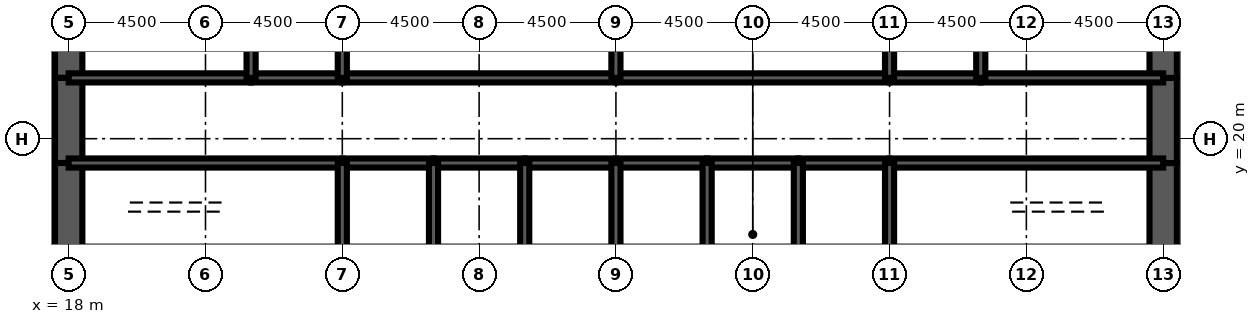
"""IFC4 building model, lengths in metres.
Left out: names, types, materials, properties, quantities, classifications, styles, units other than length and angle.
Written with IfcOpenShell. Run it as: python <this file> out.ifc"""

import sys

from ifc_helpers import new_model, si_unit, direction, frame, frame_2d, origin, place, context, subcontext, project, spatial, rectangle, extrude, element, fill, save


model = new_model("IFC4")
c1 = context("Model", 3, precision=1e-05, world=origin(), true_north=direction((0.0, 1.0)))
c2 = subcontext(c1, "Body", "Model", "MODEL_VIEW")
j1 = project(units=[si_unit("LENGTHUNIT", "METRE"), si_unit("PLANEANGLEUNIT", "RADIAN")], contexts=[c1])
p1 = place(None, origin())
s1 = spatial("IfcSite", under=j1, at=p1, CompositionType="ELEMENT")
p2 = place(p1, origin())
s2 = spatial("IfcBuilding", under=s1, at=p2, CompositionType="ELEMENT")
p3 = place(p2, frame((0.0, 0.0, 138.3)))
s3 = spatial("IfcBuildingStorey", under=s2, at=p3, CompositionType="ELEMENT", Elevation=138.3)
p4 = place(p3, frame((18.0, 26.0, 0.0), z_axis=(0.0, 0.0, 1.0), x_axis=(0.0, -1.0, 0.0)))
e1 = element("IfcWall", 1, at=p4, inside=s3, PredefinedType="SHEAR", context=c2, shape_type="SweptSolid", body=[
    extrude(rectangle(XDim=4.0, YDim=0.9, at=frame_2d((2.0, 0.0))), origin(), (0.0, 0.0, 1.0), 4.2),
])
p5 = place(p3, frame((18.0, 22.0, 0.0), z_axis=(0.0, 0.0, 1.0), x_axis=(0.0, -1.0, 0.0)))
e2 = element("IfcWall", 2, at=p5, inside=s3, PredefinedType="SHEAR", context=c2, shape_type="SweptSolid", body=[
    extrude(rectangle(XDim=2.8, YDim=0.9, at=frame_2d((1.4, 0.0))), origin(), (0.0, 0.0, 1.0), 4.2),
])
p6 = place(p5, frame((0.6, 0.0, 0.0)))
e3 = element("IfcOpeningElement", 3, at=p6, cuts=e2, PredefinedType="OPENING", context=c2, shape_type="SweptSolid", body=[
    extrude(rectangle(XDim=1.8, YDim=2.1, at=frame_2d((0.9, 1.05))), frame((0.0, 0.46, 0.0), z_axis=(0.0, -1.0, 0.0), x_axis=(1.0, 0.0, 0.0)), (0.0, 0.0, 1.0), 0.92),
])
for number, where, z_axis, x_axis in (
    (4, (18.0, 19.2, 0.0), (0.0, 0.0, 1.0), (0.0, -1.0, 0.0)),
    (5, (54.0, 16.0, 0.0), (0.0, 0.0, 1.0), (0.0, 1.0, 0.0)),
):
    element("IfcWall", number, at=place(p3, frame(where, z_axis=z_axis, x_axis=x_axis)), inside=s3, PredefinedType="SHEAR", context=c2, shape_type="SweptSolid", body=[
        extrude(rectangle(XDim=3.2, YDim=0.9, at=frame_2d((1.6, 0.0))), origin(), (0.0, 0.0, 1.0), 4.2),
    ])
p7 = place(p3, frame((54.0, 19.2, 0.0), z_axis=(0.0, 0.0, 1.0), x_axis=(0.0, 1.0, 0.0)))
e6 = element("IfcWall", 6, at=p7, inside=s3, PredefinedType="SHEAR", context=c2, shape_type="SweptSolid", body=[
    extrude(rectangle(XDim=2.8, YDim=0.9, at=frame_2d((1.4, 0.0))), origin(), (0.0, 0.0, 1.0), 4.2),
])
p8 = place(p7, frame((0.4, 0.0, 0.0)))
e7 = element("IfcOpeningElement", 7, at=p8, cuts=e6, PredefinedType="OPENING", context=c2, shape_type="SweptSolid", body=[
    extrude(rectangle(XDim=1.8, YDim=2.1, at=frame_2d((0.9, 1.05))), frame((0.0, 0.46, 0.0), z_axis=(0.0, -1.0, 0.0), x_axis=(1.0, 0.0, 0.0)), (0.0, 0.0, 1.0), 0.92),
])
p9 = place(p3, frame((54.0, 22.0, 0.0), z_axis=(0.0, 0.0, 1.0), x_axis=(0.0, 1.0, 0.0)))
e8 = element("IfcWall", 8, at=p9, inside=s3, PredefinedType="SHEAR", context=c2, shape_type="SweptSolid", body=[
    extrude(rectangle(XDim=4.0, YDim=0.9, at=frame_2d((2.0, 0.0))), origin(), (0.0, 0.0, 1.0), 4.2),
])
p10 = place(p3, frame((18.0, 19.2, 0.0), z_axis=(0.0, 0.0, 1.0), x_axis=(1.0, 0.0, 0.0)))
e9 = element("IfcWall", 9, at=p10, inside=s3, PredefinedType="SOLIDWALL", context=c2, shape_type="SweptSolid", body=[
    extrude(rectangle(XDim=9.0, YDim=0.3, at=frame_2d((4.5, 0.0))), origin(), (0.0, 0.0, 1.0), 4.2),
])
p11 = place(p10, frame((0.65, 0.0, 0.0)))
e10 = element("IfcOpeningElement", 10, at=p11, cuts=e9, PredefinedType="OPENING", context=c2, shape_type="SweptSolid", body=[
    extrude(rectangle(XDim=1.0, YDim=2.1, at=frame_2d((0.5, 1.05))), frame((0.0, 0.16, 0.0), z_axis=(0.0, -1.0, 0.0), x_axis=(1.0, 0.0, 0.0)), (0.0, 0.0, 1.0), 0.32),
])
p12 = place(p3, frame((27.0, 19.2, 0.0), z_axis=(0.0, 0.0, 1.0), x_axis=(1.0, 0.0, 0.0)))
e11 = element("IfcWall", 11, at=p12, inside=s3, PredefinedType="SOLIDWALL", context=c2, shape_type="SweptSolid", body=[
    extrude(rectangle(XDim=3.0, YDim=0.3, at=frame_2d((1.5, 0.0))), origin(), (0.0, 0.0, 1.0), 4.2),
])
p13 = place(p12, frame((0.95, 0.0, 0.0)))
e12 = element("IfcOpeningElement", 12, at=p13, cuts=e11, PredefinedType="OPENING", context=c2, shape_type="SweptSolid", body=[
    extrude(rectangle(XDim=1.1, YDim=2.2, at=frame_2d((0.55, 1.1))), frame((0.0, 0.16, 0.0), z_axis=(0.0, -1.0, 0.0), x_axis=(1.0, 0.0, 0.0)), (0.0, 0.0, 1.0), 0.32),
])
p14 = place(p3, frame((30.0, 19.2, 0.0), z_axis=(0.0, 0.0, 1.0), x_axis=(1.0, 0.0, 0.0)))
e13 = element("IfcWall", 13, at=p14, inside=s3, PredefinedType="SOLIDWALL", context=c2, shape_type="SweptSolid", body=[
    extrude(rectangle(XDim=3.0, YDim=0.3, at=frame_2d((1.5, 0.0))), origin(), (0.0, 0.0, 1.0), 4.2),
])
p15 = place(p14, frame((0.95, 0.0, 0.0)))
e14 = element("IfcOpeningElement", 14, at=p15, cuts=e13, PredefinedType="OPENING", context=c2, shape_type="SweptSolid", body=[
    extrude(rectangle(XDim=1.1, YDim=2.2, at=frame_2d((0.55, 1.1))), frame((0.0, 0.16, 0.0), z_axis=(0.0, -1.0, 0.0), x_axis=(1.0, 0.0, 0.0)), (0.0, 0.0, 1.0), 0.32),
])
p16 = place(p3, frame((33.0, 19.2, 0.0), z_axis=(0.0, 0.0, 1.0), x_axis=(1.0, 0.0, 0.0)))
e15 = element("IfcWall", 15, at=p16, inside=s3, PredefinedType="SOLIDWALL", context=c2, shape_type="SweptSolid", body=[
    extrude(rectangle(XDim=3.0, YDim=0.3, at=frame_2d((1.5, 0.0))), origin(), (0.0, 0.0, 1.0), 4.2),
])
p17 = place(p16, frame((0.95, 0.0, 0.0)))
e16 = element("IfcOpeningElement", 16, at=p17, cuts=e15, PredefinedType="OPENING", context=c2, shape_type="SweptSolid", body=[
    extrude(rectangle(XDim=1.1, YDim=2.2, at=frame_2d((0.55, 1.1))), frame((0.0, 0.16, 0.0), z_axis=(0.0, -1.0, 0.0), x_axis=(1.0, 0.0, 0.0)), (0.0, 0.0, 1.0), 0.32),
])
p18 = place(p3, frame((36.0, 19.2, 0.0), z_axis=(0.0, 0.0, 1.0), x_axis=(1.0, 0.0, 0.0)))
e17 = element("IfcWall", 17, at=p18, inside=s3, PredefinedType="SOLIDWALL", context=c2, shape_type="SweptSolid", body=[
    extrude(rectangle(XDim=3.0, YDim=0.3, at=frame_2d((1.5, 0.0))), origin(), (0.0, 0.0, 1.0), 4.2),
])
p19 = place(p18, frame((0.95, 0.0, 0.0)))
e18 = element("IfcOpeningElement", 18, at=p19, cuts=e17, PredefinedType="OPENING", context=c2, shape_type="SweptSolid", body=[
    extrude(rectangle(XDim=1.1, YDim=2.2, at=frame_2d((0.55, 1.1))), frame((0.0, 0.16, 0.0), z_axis=(0.0, -1.0, 0.0), x_axis=(1.0, 0.0, 0.0)), (0.0, 0.0, 1.0), 0.32),
])
p20 = place(p3, frame((39.0, 19.2, 0.0), z_axis=(0.0, 0.0, 1.0), x_axis=(1.0, 0.0, 0.0)))
e19 = element("IfcWall", 19, at=p20, inside=s3, PredefinedType="SOLIDWALL", context=c2, shape_type="SweptSolid", body=[
    extrude(rectangle(XDim=3.0, YDim=0.3, at=frame_2d((1.5, 0.0))), origin(), (0.0, 0.0, 1.0), 4.2),
])
p21 = place(p20, frame((1.0, 0.0, 0.0)))
e20 = element("IfcOpeningElement", 20, at=p21, cuts=e19, PredefinedType="OPENING", context=c2, shape_type="SweptSolid", body=[
    extrude(rectangle(XDim=1.0, YDim=2.1, at=frame_2d((0.5, 1.05))), frame((0.0, 0.16, 0.0), z_axis=(0.0, -1.0, 0.0), x_axis=(1.0, 0.0, 0.0)), (0.0, 0.0, 1.0), 0.32),
])
p22 = place(p3, frame((42.0, 19.2, 0.0), z_axis=(0.0, 0.0, 1.0), x_axis=(1.0, 0.0, 0.0)))
e21 = element("IfcWall", 21, at=p22, inside=s3, PredefinedType="SOLIDWALL", context=c2, shape_type="SweptSolid", body=[
    extrude(rectangle(XDim=3.0, YDim=0.3, at=frame_2d((1.5, 0.0))), origin(), (0.0, 0.0, 1.0), 4.2),
])
p23 = place(p3, frame((45.0, 19.2, 0.0), z_axis=(0.0, 0.0, 1.0), x_axis=(1.0, 0.0, 0.0)))
e22 = element("IfcWall", 22, at=p23, inside=s3, PredefinedType="SOLIDWALL", context=c2, shape_type="SweptSolid", body=[
    extrude(rectangle(XDim=9.0, YDim=0.3, at=frame_2d((4.5, 0.0))), origin(), (0.0, 0.0, 1.0), 4.2),
])
p24 = place(p23, frame((7.35, 0.0, 0.0)))
e23 = element("IfcOpeningElement", 23, at=p24, cuts=e22, PredefinedType="OPENING", context=c2, shape_type="SweptSolid", body=[
    extrude(rectangle(XDim=1.0, YDim=2.1, at=frame_2d((0.5, 1.05))), frame((0.0, 0.16, 0.0), z_axis=(0.0, -1.0, 0.0), x_axis=(1.0, 0.0, 0.0)), (0.0, 0.0, 1.0), 0.32),
])
p25 = place(p3, frame((18.0, 22.0, 0.0), z_axis=(0.0, 0.0, 1.0), x_axis=(1.0, 0.0, 0.0)))
e24 = element("IfcWall", 24, at=p25, inside=s3, PredefinedType="SOLIDWALL", context=c2, shape_type="SweptSolid", body=[
    extrude(rectangle(XDim=6.0, YDim=0.3, at=frame_2d((3.0, 0.0))), origin(), (0.0, 0.0, 1.0), 4.2),
])
p26 = place(p25, frame((4.4, 0.0, 0.0)))
e25 = element("IfcOpeningElement", 25, at=p26, cuts=e24, PredefinedType="OPENING", context=c2, shape_type="SweptSolid", body=[
    extrude(rectangle(XDim=1.0, YDim=2.1, at=frame_2d((0.5, 1.05))), frame((0.0, 0.16, 0.0), z_axis=(0.0, -1.0, 0.0), x_axis=(1.0, 0.0, 0.0)), (0.0, 0.0, 1.0), 0.32),
])
p27 = place(p25, frame((1.0, 0.0, 0.0)))
e26 = element("IfcOpeningElement", 26, at=p27, cuts=e24, PredefinedType="OPENING", context=c2, shape_type="SweptSolid", body=[
    extrude(rectangle(XDim=1.0, YDim=2.1, at=frame_2d((0.5, 1.05))), frame((0.0, 0.16, 0.0), z_axis=(0.0, -1.0, 0.0), x_axis=(1.0, 0.0, 0.0)), (0.0, 0.0, 1.0), 0.32),
])
p28 = place(p3, frame((24.0, 22.0, 0.0), z_axis=(0.0, 0.0, 1.0), x_axis=(1.0, 0.0, 0.0)))
e27 = element("IfcWall", 27, at=p28, inside=s3, PredefinedType="SOLIDWALL", context=c2, shape_type="SweptSolid", body=[
    extrude(rectangle(XDim=3.0, YDim=0.3, at=frame_2d((1.5, 0.0))), origin(), (0.0, 0.0, 1.0), 4.2),
])
p29 = place(p28, frame((1.0, 0.0, 0.0)))
e28 = element("IfcOpeningElement", 28, at=p29, cuts=e27, PredefinedType="OPENING", context=c2, shape_type="SweptSolid", body=[
    extrude(rectangle(XDim=1.0, YDim=2.1, at=frame_2d((0.5, 1.05))), frame((0.0, 0.16, 0.0), z_axis=(0.0, -1.0, 0.0), x_axis=(1.0, 0.0, 0.0)), (0.0, 0.0, 1.0), 0.32),
])
p30 = place(p3, frame((27.0, 22.0, 0.0), z_axis=(0.0, 0.0, 1.0), x_axis=(1.0, 0.0, 0.0)))
e29 = element("IfcWall", 29, at=p30, inside=s3, PredefinedType="SOLIDWALL", context=c2, shape_type="SweptSolid", body=[
    extrude(rectangle(XDim=9.0, YDim=0.3, at=frame_2d((4.5, 0.0))), origin(), (0.0, 0.0, 1.0), 4.2),
])
p31 = place(p30, frame((4.0, 0.0, 0.0)))
e30 = element("IfcOpeningElement", 30, at=p31, cuts=e29, PredefinedType="OPENING", context=c2, shape_type="SweptSolid", body=[
    extrude(rectangle(XDim=1.0, YDim=2.1, at=frame_2d((0.5, 1.05))), frame((0.0, 0.16, 0.0), z_axis=(0.0, -1.0, 0.0), x_axis=(1.0, 0.0, 0.0)), (0.0, 0.0, 1.0), 0.32),
])
p32 = place(p3, frame((36.0, 22.0, 0.0), z_axis=(0.0, 0.0, 1.0), x_axis=(1.0, 0.0, 0.0)))
e31 = element("IfcWall", 31, at=p32, inside=s3, PredefinedType="SOLIDWALL", context=c2, shape_type="SweptSolid", body=[
    extrude(rectangle(XDim=9.0, YDim=0.3, at=frame_2d((4.5, 0.0))), origin(), (0.0, 0.0, 1.0), 4.2),
])
p33 = place(p32, frame((4.0, 0.0, 0.0)))
e32 = element("IfcOpeningElement", 32, at=p33, cuts=e31, PredefinedType="OPENING", context=c2, shape_type="SweptSolid", body=[
    extrude(rectangle(XDim=1.0, YDim=2.1, at=frame_2d((0.5, 1.05))), frame((0.0, 0.16, 0.0), z_axis=(0.0, -1.0, 0.0), x_axis=(1.0, 0.0, 0.0)), (0.0, 0.0, 1.0), 0.32),
])
p34 = place(p3, frame((45.0, 22.0, 0.0), z_axis=(0.0, 0.0, 1.0), x_axis=(1.0, 0.0, 0.0)))
e33 = element("IfcWall", 33, at=p34, inside=s3, PredefinedType="SOLIDWALL", context=c2, shape_type="SweptSolid", body=[
    extrude(rectangle(XDim=3.0, YDim=0.3, at=frame_2d((1.5, 0.0))), origin(), (0.0, 0.0, 1.0), 4.2),
])
p35 = place(p34, frame((1.0, 0.0, 0.0)))
e34 = element("IfcOpeningElement", 34, at=p35, cuts=e33, PredefinedType="OPENING", context=c2, shape_type="SweptSolid", body=[
    extrude(rectangle(XDim=1.0, YDim=2.1, at=frame_2d((0.5, 1.05))), frame((0.0, 0.16, 0.0), z_axis=(0.0, -1.0, 0.0), x_axis=(1.0, 0.0, 0.0)), (0.0, 0.0, 1.0), 0.32),
])
p36 = place(p3, frame((48.0, 22.0, 0.0), z_axis=(0.0, 0.0, 1.0), x_axis=(1.0, 0.0, 0.0)))
e35 = element("IfcWall", 35, at=p36, inside=s3, PredefinedType="SOLIDWALL", context=c2, shape_type="SweptSolid", body=[
    extrude(rectangle(XDim=6.0, YDim=0.3, at=frame_2d((3.0, 0.0))), origin(), (0.0, 0.0, 1.0), 4.2),
])
p37 = place(p36, frame((2.0, 0.0, 0.0)))
e36 = element("IfcOpeningElement", 36, at=p37, cuts=e35, PredefinedType="OPENING", context=c2, shape_type="SweptSolid", body=[
    extrude(rectangle(XDim=1.0, YDim=2.1, at=frame_2d((0.5, 1.05))), frame((0.0, 0.16, 0.0), z_axis=(0.0, -1.0, 0.0), x_axis=(1.0, 0.0, 0.0)), (0.0, 0.0, 1.0), 0.32),
])
p38 = place(p36, frame((4.0, 0.0, 0.0)))
e37 = element("IfcOpeningElement", 37, at=p38, cuts=e35, PredefinedType="OPENING", context=c2, shape_type="SweptSolid", body=[
    extrude(rectangle(XDim=1.0, YDim=2.1, at=frame_2d((0.5, 1.05))), frame((0.0, 0.16, 0.0), z_axis=(0.0, -1.0, 0.0), x_axis=(1.0, 0.0, 0.0)), (0.0, 0.0, 1.0), 0.32),
])
for number, where, z_axis, x_axis in (
    (38, (27.0, 16.0, 0.0), (0.0, 0.0, 1.0), (0.0, 1.0, 0.0)),
    (39, (30.0, 16.0, 0.0), (0.0, 0.0, 1.0), (0.0, 1.0, 0.0)),
    (40, (33.0, 16.0, 0.0), (0.0, 0.0, 1.0), (0.0, 1.0, 0.0)),
    (41, (36.0, 16.0, 0.0), (0.0, 0.0, 1.0), (0.0, 1.0, 0.0)),
    (42, (39.0, 16.0, 0.0), (0.0, 0.0, 1.0), (0.0, 1.0, 0.0)),
    (43, (42.0, 16.0, 0.0), (0.0, 0.0, 1.0), (0.0, 1.0, 0.0)),
    (44, (45.0, 16.0, 0.0), (0.0, 0.0, 1.0), (0.0, 1.0, 0.0)),
):
    element("IfcWall", number, at=place(p3, frame(where, z_axis=z_axis, x_axis=x_axis)), inside=s3, PredefinedType="SOLIDWALL", context=c2, shape_type="SweptSolid", body=[
        extrude(rectangle(XDim=3.2, YDim=0.3, at=frame_2d((1.6, 0.0))), origin(), (0.0, 0.0, 1.0), 4.2),
    ])
for number, where, z_axis, x_axis in (
    (45, (24.0, 22.0, 0.0), (0.0, 0.0, 1.0), (0.0, 1.0, 0.0)),
    (46, (27.0, 22.0, 0.0), (0.0, 0.0, 1.0), (0.0, 1.0, 0.0)),
    (47, (36.0, 22.0, 0.0), (0.0, 0.0, 1.0), (0.0, 1.0, 0.0)),
    (48, (45.0, 22.0, 0.0), (0.0, 0.0, 1.0), (0.0, 1.0, 0.0)),
    (49, (48.0, 22.0, 0.0), (0.0, 0.0, 1.0), (0.0, 1.0, 0.0)),
):
    element("IfcWall", number, at=place(p3, frame(where, z_axis=z_axis, x_axis=x_axis)), inside=s3, PredefinedType="SOLIDWALL", context=c2, shape_type="SweptSolid", body=[
        extrude(rectangle(XDim=4.0, YDim=0.3, at=frame_2d((2.0, 0.0))), origin(), (0.0, 0.0, 1.0), 4.2),
    ])
p39 = place(p3, frame((39.15, 17.4, 0.0), z_axis=(0.0, 0.0, 1.0), x_axis=(1.0, 0.0, 0.0)))
e50 = element("IfcWall", 50, at=p39, inside=s3, PredefinedType="SOLIDWALL", context=c2, shape_type="SweptSolid", body=[
    extrude(rectangle(XDim=2.7, YDim=0.3, at=frame_2d((1.35, 0.0))), origin(), (0.0, 0.0, 1.0), 4.04),
])
p40 = place(p39, frame((0.85, 0.0, 0.0)))
e51 = element("IfcOpeningElement", 51, at=p40, cuts=e50, PredefinedType="OPENING", context=c2, shape_type="SweptSolid", body=[
    extrude(rectangle(XDim=1.0, YDim=2.1, at=frame_2d((0.5, 1.05))), frame((0.0, 0.16, 0.0), z_axis=(0.0, -1.0, 0.0), x_axis=(1.0, 0.0, 0.0)), (0.0, 0.0, 1.0), 0.32),
])
p41 = place(p3, frame((39.0, 22.15, 0.0), z_axis=(0.0, 0.0, 1.0), x_axis=(0.0, 1.0, 0.0)))
e52 = element("IfcWall", 52, at=p41, inside=s3, PredefinedType="PARTITIONING", context=c2, shape_type="SweptSolid", body=[
    extrude(rectangle(XDim=3.7, YDim=0.15, at=frame_2d((1.85, 0.0))), origin(), (0.0, 0.0, 1.0), 3.0),
])
p42 = place(p41, frame((2.2, 0.0, 0.0)))
e53 = element("IfcOpeningElement", 53, at=p42, cuts=e52, PredefinedType="OPENING", context=c2, shape_type="SweptSolid", body=[
    extrude(rectangle(XDim=1.0, YDim=2.1, at=frame_2d((0.5, 1.05))), frame((0.0, 0.085, 0.0), z_axis=(0.0, -1.0, 0.0), x_axis=(1.0, 0.0, 0.0)), (0.0, 0.0, 1.0), 0.17),
])
for number, where, z_axis, x_axis in (
    (54, (20.625, 22.15, 0.0), (0.0, 0.0, 1.0), (0.0, 1.0, 0.0)),
    (55, (51.375, 22.15, 0.0), (0.0, 0.0, 1.0), (0.0, 1.0, 0.0)),
):
    element("IfcWall", number, at=place(p3, frame(where, z_axis=z_axis, x_axis=x_axis)), inside=s3, PredefinedType="PARTITIONING", context=c2, shape_type="SweptSolid", body=[
        extrude(rectangle(XDim=3.7, YDim=0.15, at=frame_2d((1.85, 0.0))), origin(), (0.0, 0.0, 1.0), 3.0),
    ])
p43 = place(p40, origin())
e56 = element("IfcDoor", 56, at=p43, inside=s3, OperationType="SINGLE_SWING_LEFT", PredefinedType="DOOR", context=c2, shape_type="SweptSolid", body=[
    extrude(rectangle(XDim=1.0, YDim=2.1, at=frame_2d((0.5, 1.05))), frame((0.0, 0.025, 0.0), z_axis=(0.0, -1.0, 0.0), x_axis=(1.0, 0.0, 0.0)), (0.0, 0.0, 1.0), 0.05),
])
fill(e51, e56)
p44 = place(p13, origin())
e57 = element("IfcDoor", 57, at=p44, inside=s3, OperationType="DOUBLE_DOOR_SLIDING", PredefinedType="USERDEFINED", context=c2, shape_type="SweptSolid", body=[
    extrude(rectangle(XDim=1.1, YDim=2.2, at=frame_2d((0.55, 1.1))), frame((0.0, 0.025, 0.0), z_axis=(0.0, -1.0, 0.0), x_axis=(1.0, 0.0, 0.0)), (0.0, 0.0, 1.0), 0.05),
])
fill(e12, e57)
p45 = place(p15, origin())
e58 = element("IfcDoor", 58, at=p45, inside=s3, OperationType="DOUBLE_DOOR_SLIDING", PredefinedType="USERDEFINED", context=c2, shape_type="SweptSolid", body=[
    extrude(rectangle(XDim=1.1, YDim=2.2, at=frame_2d((0.55, 1.1))), frame((0.0, 0.025, 0.0), z_axis=(0.0, -1.0, 0.0), x_axis=(1.0, 0.0, 0.0)), (0.0, 0.0, 1.0), 0.05),
])
fill(e14, e58)
p46 = place(p17, origin())
e59 = element("IfcDoor", 59, at=p46, inside=s3, OperationType="DOUBLE_DOOR_SLIDING", PredefinedType="USERDEFINED", context=c2, shape_type="SweptSolid", body=[
    extrude(rectangle(XDim=1.1, YDim=2.2, at=frame_2d((0.55, 1.1))), frame((0.0, 0.025, 0.0), z_axis=(0.0, -1.0, 0.0), x_axis=(1.0, 0.0, 0.0)), (0.0, 0.0, 1.0), 0.05),
])
fill(e16, e59)
p47 = place(p19, origin())
e60 = element("IfcDoor", 60, at=p47, inside=s3, OperationType="DOUBLE_DOOR_SLIDING", PredefinedType="USERDEFINED", context=c2, shape_type="SweptSolid", body=[
    extrude(rectangle(XDim=1.1, YDim=2.2, at=frame_2d((0.55, 1.1))), frame((0.0, 0.025, 0.0), z_axis=(0.0, -1.0, 0.0), x_axis=(1.0, 0.0, 0.0)), (0.0, 0.0, 1.0), 0.05),
])
fill(e18, e60)
p48 = place(p11, origin())
e61 = element("IfcDoor", 61, at=p48, inside=s3, OperationType="SINGLE_SWING_LEFT", PredefinedType="DOOR", context=c2, shape_type="SweptSolid", body=[
    extrude(rectangle(XDim=1.0, YDim=2.1, at=frame_2d((0.5, 1.05))), frame((0.0, 0.025, 0.0), z_axis=(0.0, -1.0, 0.0), x_axis=(1.0, 0.0, 0.0)), (0.0, 0.0, 1.0), 0.05),
])
fill(e10, e61)
p49 = place(p24, origin())
e62 = element("IfcDoor", 62, at=p49, inside=s3, OperationType="SINGLE_SWING_RIGHT", PredefinedType="DOOR", context=c2, shape_type="SweptSolid", body=[
    extrude(rectangle(XDim=1.0, YDim=2.1, at=frame_2d((0.5, 1.05))), frame((0.0, 0.025, 0.0), z_axis=(0.0, -1.0, 0.0), x_axis=(1.0, 0.0, 0.0)), (0.0, 0.0, 1.0), 0.05),
])
fill(e23, e62)
p50 = place(p6, origin())
e63 = element("IfcDoor", 63, at=p50, inside=s3, OperationType="SINGLE_SWING_LEFT", PredefinedType="DOOR", context=c2, shape_type="SweptSolid", body=[
    extrude(rectangle(XDim=1.8, YDim=2.1, at=frame_2d((0.9, 1.05))), frame((0.0, 0.45, 0.0), z_axis=(0.0, -1.0, 0.0), x_axis=(1.0, 0.0, 0.0)), (0.0, 0.0, 1.0), 0.899),
])
fill(e3, e63)
p51 = place(p8, origin())
e64 = element("IfcDoor", 64, at=p51, inside=s3, OperationType="SINGLE_SWING_LEFT", PredefinedType="DOOR", context=c2, shape_type="SweptSolid", body=[
    extrude(rectangle(XDim=1.8, YDim=2.1, at=frame_2d((0.9, 1.05))), frame((0.0, 0.45, 0.0), z_axis=(0.0, -1.0, 0.0), x_axis=(1.0, 0.0, 0.0)), (0.0, 0.0, 1.0), 0.899),
])
fill(e7, e64)
p52 = place(p26, origin())
e65 = element("IfcDoor", 65, at=p52, inside=s3, OperationType="SINGLE_SWING_RIGHT", PredefinedType="DOOR", context=c2, shape_type="SweptSolid", body=[
    extrude(rectangle(XDim=1.0, YDim=2.1, at=frame_2d((0.5, 1.05))), frame((0.0, 0.025, 0.0), z_axis=(0.0, -1.0, 0.0), x_axis=(1.0, 0.0, 0.0)), (0.0, 0.0, 1.0), 0.05),
])
fill(e25, e65)
p53 = place(p29, origin())
e66 = element("IfcDoor", 66, at=p53, inside=s3, OperationType="SINGLE_SWING_LEFT", PredefinedType="DOOR", context=c2, shape_type="SweptSolid", body=[
    extrude(rectangle(XDim=1.0, YDim=2.1, at=frame_2d((0.5, 1.05))), frame((0.0, 0.025, 0.0), z_axis=(0.0, -1.0, 0.0), x_axis=(1.0, 0.0, 0.0)), (0.0, 0.0, 1.0), 0.05),
])
fill(e28, e66)
p54 = place(p31, origin())
e67 = element("IfcDoor", 67, at=p54, inside=s3, OperationType="SINGLE_SWING_LEFT", PredefinedType="DOOR", context=c2, shape_type="SweptSolid", body=[
    extrude(rectangle(XDim=1.0, YDim=2.1, at=frame_2d((0.5, 1.05))), frame((0.0, 0.025, 0.0), z_axis=(0.0, -1.0, 0.0), x_axis=(1.0, 0.0, 0.0)), (0.0, 0.0, 1.0), 0.05),
])
fill(e30, e67)
p55 = place(p33, origin())
e68 = element("IfcDoor", 68, at=p55, inside=s3, OperationType="SINGLE_SWING_LEFT", PredefinedType="DOOR", context=c2, shape_type="SweptSolid", body=[
    extrude(rectangle(XDim=1.0, YDim=2.1, at=frame_2d((0.5, 1.05))), frame((0.0, 0.025, 0.0), z_axis=(0.0, -1.0, 0.0), x_axis=(1.0, 0.0, 0.0)), (0.0, 0.0, 1.0), 0.05),
])
fill(e32, e68)
p56 = place(p35, origin())
e69 = element("IfcDoor", 69, at=p56, inside=s3, OperationType="SINGLE_SWING_LEFT", PredefinedType="DOOR", context=c2, shape_type="SweptSolid", body=[
    extrude(rectangle(XDim=1.0, YDim=2.1, at=frame_2d((0.5, 1.05))), frame((0.0, 0.025, 0.0), z_axis=(0.0, -1.0, 0.0), x_axis=(1.0, 0.0, 0.0)), (0.0, 0.0, 1.0), 0.05),
])
fill(e34, e69)
p57 = place(p37, origin())
e70 = element("IfcDoor", 70, at=p57, inside=s3, OperationType="SINGLE_SWING_LEFT", PredefinedType="DOOR", context=c2, shape_type="SweptSolid", body=[
    extrude(rectangle(XDim=1.0, YDim=2.1, at=frame_2d((0.5, 1.05))), frame((0.0, 0.025, 0.0), z_axis=(0.0, -1.0, 0.0), x_axis=(1.0, 0.0, 0.0)), (0.0, 0.0, 1.0), 0.05),
])
fill(e36, e70)
p58 = place(p27, origin())
e71 = element("IfcDoor", 71, at=p58, inside=s3, OperationType="SINGLE_SWING_LEFT", PredefinedType="DOOR", context=c2, shape_type="SweptSolid", body=[
    extrude(rectangle(XDim=1.0, YDim=2.1, at=frame_2d((0.5, 1.05))), frame((0.0, 0.025, 0.0), z_axis=(0.0, -1.0, 0.0), x_axis=(1.0, 0.0, 0.0)), (0.0, 0.0, 1.0), 0.05),
])
fill(e26, e71)
p59 = place(p38, origin())
e72 = element("IfcDoor", 72, at=p59, inside=s3, OperationType="SINGLE_SWING_RIGHT", PredefinedType="DOOR", context=c2, shape_type="SweptSolid", body=[
    extrude(rectangle(XDim=1.0, YDim=2.1, at=frame_2d((0.5, 1.05))), frame((0.0, 0.025, 0.0), z_axis=(0.0, -1.0, 0.0), x_axis=(1.0, 0.0, 0.0)), (0.0, 0.0, 1.0), 0.05),
])
fill(e37, e72)
p60 = place(p21, origin())
e73 = element("IfcDoor", 73, at=p60, inside=s3, OperationType="SINGLE_SWING_LEFT", PredefinedType="DOOR", context=c2, shape_type="SweptSolid", body=[
    extrude(rectangle(XDim=1.0, YDim=2.1, at=frame_2d((0.5, 1.05))), frame((0.0, 0.025, 0.0), z_axis=(0.0, -1.0, 0.0), x_axis=(1.0, 0.0, 0.0)), (0.0, 0.0, 1.0), 0.05),
])
fill(e20, e73)
save(model, sys.argv[1])
